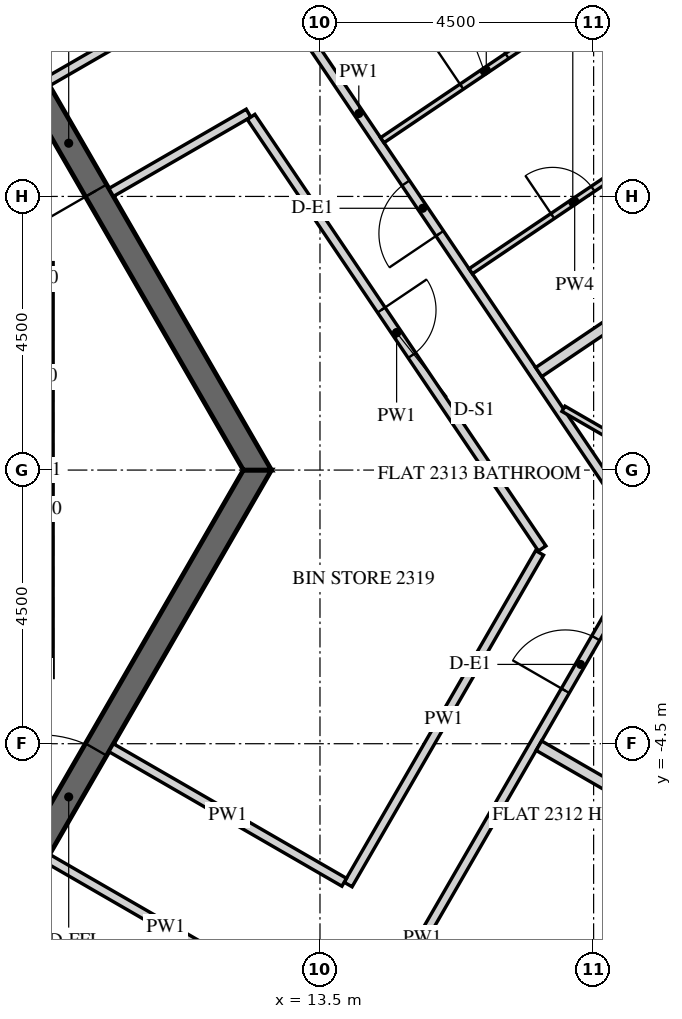
"""IFC4 building model, lengths in metres.
Left out: names, types, materials, properties, quantities, classifications, styles, units other than length and angle.
Written with IfcOpenShell. Run it as: python <this file> out.ifc"""

import sys

from ifc_helpers import new_model, si_unit, direction, frame, frame_2d, origin, place, context, subcontext, project, spatial, polyline, rectangle, outline, extrude, element, fill, save


model = new_model("IFC4")
c1 = context("Model", 3, precision=1e-05, world=origin(), true_north=direction((0.0, 1.0)))
c2 = subcontext(c1, "Body", "Model", "MODEL_VIEW")
j1 = project(units=[si_unit("LENGTHUNIT", "METRE"), si_unit("PLANEANGLEUNIT", "RADIAN")], contexts=[c1])
p1 = place(None, origin())
s1 = spatial("IfcSite", under=j1, at=p1, CompositionType="ELEMENT")
p2 = place(p1, origin())
s2 = spatial("IfcBuilding", under=s1, at=p2, CompositionType="ELEMENT")
p3 = place(p2, frame((0.0, 0.0, 291.3)))
s3 = spatial("IfcBuildingStorey", under=s2, at=p3, CompositionType="ELEMENT", Elevation=291.3)
p4 = place(p3, frame((16.451, -23.005, -0.15), z_axis=(0.0, 0.0, 1.0), x_axis=(0.500003737743, 0.866023245787, 0.0)))
e1 = element("IfcWall", 1, at=p4, inside=s3, PredefinedType="SOLIDWALL", context=c2, shape_type="SweptSolid", body=[
    extrude(outline(polyline([(-0.021, -0.25), (25.468, -0.25), (25.421, 0.25), (0.021, 0.25), (-0.021, -0.25)])), origin(), (0.0, 0.0, 1.0), 3.9),
])
p5 = place(p4, frame((2.522, 0.0, 0.75)))
e2 = element("IfcOpeningElement", 2, at=p5, cuts=e1, PredefinedType="OPENING", context=c2, shape_type="SweptSolid", body=[
    extrude(rectangle(XDim=2.4, YDim=2.7, at=frame_2d((1.2, 1.35))), frame((0.0, 0.26, 0.0), z_axis=(0.0, -1.0, 0.0), x_axis=(1.0, 0.0, 0.0)), (0.0, 0.0, 1.0), 0.52),
])
p6 = place(p4, frame((6.122, 0.0, 0.75)))
e3 = element("IfcOpeningElement", 3, at=p6, cuts=e1, PredefinedType="OPENING", context=c2, shape_type="SweptSolid", body=[
    extrude(rectangle(XDim=2.4, YDim=2.7, at=frame_2d((1.2, 1.35))), frame((0.0, 0.26, 0.0), z_axis=(0.0, -1.0, 0.0), x_axis=(1.0, 0.0, 0.0)), (0.0, 0.0, 1.0), 0.52),
])
p7 = place(p4, frame((9.722, 0.0, 0.75)))
e4 = element("IfcOpeningElement", 4, at=p7, cuts=e1, PredefinedType="OPENING", context=c2, shape_type="SweptSolid", body=[
    extrude(rectangle(XDim=2.4, YDim=2.7, at=frame_2d((1.2, 1.35))), frame((0.0, 0.26, 0.0), z_axis=(0.0, -1.0, 0.0), x_axis=(1.0, 0.0, 0.0)), (0.0, 0.0, 1.0), 0.52),
])
p8 = place(p4, frame((13.323, 0.0, 0.75)))
e5 = element("IfcOpeningElement", 5, at=p8, cuts=e1, PredefinedType="OPENING", context=c2, shape_type="SweptSolid", body=[
    extrude(rectangle(XDim=2.4, YDim=2.7, at=frame_2d((1.2, 1.35))), frame((0.0, 0.26, 0.0), z_axis=(0.0, -1.0, 0.0), x_axis=(1.0, 0.0, 0.0)), (0.0, 0.0, 1.0), 0.52),
])
p9 = place(p4, frame((16.922, 0.0, 0.75)))
e6 = element("IfcOpeningElement", 6, at=p9, cuts=e1, PredefinedType="OPENING", context=c2, shape_type="SweptSolid", body=[
    extrude(rectangle(XDim=2.4, YDim=2.7, at=frame_2d((1.2, 1.35))), frame((0.0, 0.26, 0.0), z_axis=(0.0, -1.0, 0.0), x_axis=(1.0, 0.0, 0.0)), (0.0, 0.0, 1.0), 0.52),
])
p10 = place(p4, frame((20.522, 0.0, 0.75)))
e7 = element("IfcOpeningElement", 7, at=p10, cuts=e1, PredefinedType="OPENING", context=c2, shape_type="SweptSolid", body=[
    extrude(rectangle(XDim=2.4, YDim=2.7, at=frame_2d((1.2, 1.35))), frame((0.0, 0.26, 0.0), z_axis=(0.0, -1.0, 0.0), x_axis=(1.0, 0.0, 0.0)), (0.0, 0.0, 1.0), 0.52),
])
p11 = place(p3, frame((26.706, 2.879, -0.15), z_axis=(0.0, 0.0, 1.0), x_axis=(-0.559197891507, 0.829034208061, 0.0)))
e8 = element("IfcWall", 8, at=p11, inside=s3, PredefinedType="SOLIDWALL", context=c2, shape_type="SweptSolid", body=[
    extrude(outline(polyline([(0.25, -0.25), (22.795, -0.25), (23.295, 0.25), (-0.25, 0.25), (0.25, -0.25)])), origin(), (0.0, 0.0, 1.0), 3.9),
])
p12 = place(p11, frame((1.323, 0.0, 1.05)))
e9 = element("IfcOpeningElement", 9, at=p12, cuts=e8, PredefinedType="OPENING", context=c2, shape_type="SweptSolid", body=[
    extrude(rectangle(XDim=0.9, YDim=1.5, at=frame_2d((0.45, 0.75))), frame((0.0, 0.26, 0.0), z_axis=(0.0, -1.0, 0.0), x_axis=(1.0, 0.0, 0.0)), (0.0, 0.0, 1.0), 0.52),
])
p13 = place(p11, frame((2.522, 0.0, 0.15)))
e10 = element("IfcOpeningElement", 10, at=p13, cuts=e8, PredefinedType="OPENING", context=c2, shape_type="SweptSolid", body=[
    extrude(rectangle(XDim=1.2, YDim=2.4, at=frame_2d((0.6, 1.2))), frame((0.0, 0.26, 0.0), z_axis=(0.0, -1.0, 0.0), x_axis=(1.0, 0.0, 0.0)), (0.0, 0.0, 1.0), 0.52),
])
p14 = place(p11, frame((4.922, 0.0, 1.05)))
e11 = element("IfcOpeningElement", 11, at=p14, cuts=e8, PredefinedType="OPENING", context=c2, shape_type="SweptSolid", body=[
    extrude(rectangle(XDim=0.9, YDim=1.5, at=frame_2d((0.45, 0.75))), frame((0.0, 0.26, 0.0), z_axis=(0.0, -1.0, 0.0), x_axis=(1.0, 0.0, 0.0)), (0.0, 0.0, 1.0), 0.52),
])
p15 = place(p11, frame((6.122, 0.0, 0.15)))
e12 = element("IfcOpeningElement", 12, at=p15, cuts=e8, PredefinedType="OPENING", context=c2, shape_type="SweptSolid", body=[
    extrude(rectangle(XDim=1.2, YDim=2.4, at=frame_2d((0.6, 1.2))), frame((0.0, 0.26, 0.0), z_axis=(0.0, -1.0, 0.0), x_axis=(1.0, 0.0, 0.0)), (0.0, 0.0, 1.0), 0.52),
])
p16 = place(p11, frame((8.522, 0.0, 1.05)))
e13 = element("IfcOpeningElement", 13, at=p16, cuts=e8, PredefinedType="OPENING", context=c2, shape_type="SweptSolid", body=[
    extrude(rectangle(XDim=0.9, YDim=1.5, at=frame_2d((0.45, 0.75))), frame((0.0, 0.26, 0.0), z_axis=(0.0, -1.0, 0.0), x_axis=(1.0, 0.0, 0.0)), (0.0, 0.0, 1.0), 0.52),
])
p17 = place(p11, frame((9.722, 0.0, 0.15)))
e14 = element("IfcOpeningElement", 14, at=p17, cuts=e8, PredefinedType="OPENING", context=c2, shape_type="SweptSolid", body=[
    extrude(rectangle(XDim=1.2, YDim=2.4, at=frame_2d((0.6, 1.2))), frame((0.0, 0.26, 0.0), z_axis=(0.0, -1.0, 0.0), x_axis=(1.0, 0.0, 0.0)), (0.0, 0.0, 1.0), 0.52),
])
p18 = place(p11, frame((12.122, 0.0, 1.05)))
e15 = element("IfcOpeningElement", 15, at=p18, cuts=e8, PredefinedType="OPENING", context=c2, shape_type="SweptSolid", body=[
    extrude(rectangle(XDim=0.9, YDim=1.5, at=frame_2d((0.45, 0.75))), frame((0.0, 0.26, 0.0), z_axis=(0.0, -1.0, 0.0), x_axis=(1.0, 0.0, 0.0)), (0.0, 0.0, 1.0), 0.52),
])
p19 = place(p11, frame((13.323, 0.0, 0.15)))
e16 = element("IfcOpeningElement", 16, at=p19, cuts=e8, PredefinedType="OPENING", context=c2, shape_type="SweptSolid", body=[
    extrude(rectangle(XDim=1.2, YDim=2.4, at=frame_2d((0.6, 1.2))), frame((0.0, 0.26, 0.0), z_axis=(0.0, -1.0, 0.0), x_axis=(1.0, 0.0, 0.0)), (0.0, 0.0, 1.0), 0.52),
])
p20 = place(p11, frame((15.722, 0.0, 1.05)))
e17 = element("IfcOpeningElement", 17, at=p20, cuts=e8, PredefinedType="OPENING", context=c2, shape_type="SweptSolid", body=[
    extrude(rectangle(XDim=0.9, YDim=1.5, at=frame_2d((0.45, 0.75))), frame((0.0, 0.26, 0.0), z_axis=(0.0, -1.0, 0.0), x_axis=(1.0, 0.0, 0.0)), (0.0, 0.0, 1.0), 0.52),
])
p21 = place(p11, frame((16.922, 0.0, 0.15)))
e18 = element("IfcOpeningElement", 18, at=p21, cuts=e8, PredefinedType="OPENING", context=c2, shape_type="SweptSolid", body=[
    extrude(rectangle(XDim=1.2, YDim=2.4, at=frame_2d((0.6, 1.2))), frame((0.0, 0.26, 0.0), z_axis=(0.0, -1.0, 0.0), x_axis=(1.0, 0.0, 0.0)), (0.0, 0.0, 1.0), 0.52),
])
p22 = place(p11, frame((19.323, 0.0, 1.05)))
e19 = element("IfcOpeningElement", 19, at=p22, cuts=e8, PredefinedType="OPENING", context=c2, shape_type="SweptSolid", body=[
    extrude(rectangle(XDim=0.9, YDim=1.5, at=frame_2d((0.45, 0.75))), frame((0.0, 0.26, 0.0), z_axis=(0.0, -1.0, 0.0), x_axis=(1.0, 0.0, 0.0)), (0.0, 0.0, 1.0), 0.52),
])
p23 = place(p11, frame((20.522, 0.0, 0.15)))
e20 = element("IfcOpeningElement", 20, at=p23, cuts=e8, PredefinedType="OPENING", context=c2, shape_type="SweptSolid", body=[
    extrude(rectangle(XDim=1.2, YDim=2.4, at=frame_2d((0.6, 1.2))), frame((0.0, 0.26, 0.0), z_axis=(0.0, -1.0, 0.0), x_axis=(1.0, 0.0, 0.0)), (0.0, 0.0, 1.0), 0.52),
])
p24 = place(p3, frame((6.235, -10.8, -0.15), z_axis=(0.0, 0.0, 1.0), x_axis=(0.499996419489, 0.866027470984, 0.0)))
e21 = element("IfcWall", 21, at=p24, inside=s3, PredefinedType="SHEAR", context=c2, shape_type="SweptSolid", body=[
    extrude(outline(polyline([(-0.115, -0.2), (12.586, -0.2), (12.355, 0.2), (0.115, 0.2), (-0.115, -0.2)])), origin(), (0.0, 0.0, 1.0), 3.9),
])
p25 = place(p24, frame((5.364, 0.0, 0.15)))
e22 = element("IfcOpeningElement", 22, at=p25, cuts=e21, PredefinedType="OPENING", context=c2, shape_type="SweptSolid", body=[
    extrude(rectangle(XDim=1.8, YDim=2.4, at=frame_2d((0.9, 1.2))), frame((0.0, 0.21, 0.0), z_axis=(0.0, -1.0, 0.0), x_axis=(1.0, 0.0, 0.0)), (0.0, 0.0, 1.0), 0.42),
])
p26 = place(p3, frame((12.471, 0.0, -0.15), z_axis=(0.0, 0.0, 1.0), x_axis=(-0.499996419489, 0.866027470984, 0.0)))
e23 = element("IfcWall", 23, at=p26, inside=s3, PredefinedType="SHEAR", context=c2, shape_type="SweptSolid", body=[
    extrude(outline(polyline([(-0.115, -0.2), (12.586, -0.2), (12.355, 0.2), (0.115, 0.2), (-0.115, -0.2)])), origin(), (0.0, 0.0, 1.0), 3.9),
])
p27 = place(p26, frame((5.306, 0.0, 0.15)))
e24 = element("IfcOpeningElement", 24, at=p27, cuts=e23, PredefinedType="OPENING", context=c2, shape_type="SweptSolid", body=[
    extrude(rectangle(XDim=1.8, YDim=2.4, at=frame_2d((0.9, 1.2))), frame((0.0, 0.21, 0.0), z_axis=(0.0, -1.0, 0.0), x_axis=(1.0, 0.0, 0.0)), (0.0, 0.0, 1.0), 0.42),
])
p28 = place(p3, frame((11.447, -14.174, 0.0), z_axis=(0.0, 0.0, 1.0), x_axis=(0.500003306199, 0.866023494941, 0.0)))
e25 = element("IfcWall", 25, at=p28, inside=s3, PredefinedType="PARTITIONING", context=c2, shape_type="SweptSolid", body=[
    extrude(rectangle(XDim=14.949, YDim=0.15, at=frame_2d((7.475, 0.0))), origin(), (0.0, 0.0, 1.0), 2.988),
])
p29 = place(p28, frame((2.325, 0.0, 0.0)))
e26 = element("IfcOpeningElement", 26, at=p29, cuts=e25, PredefinedType="OPENING", context=c2, shape_type="SweptSolid", body=[
    extrude(rectangle(XDim=1.0, YDim=2.1, at=frame_2d((0.5, 1.05))), frame((0.0, 0.085, 0.0), z_axis=(0.0, -1.0, 0.0), x_axis=(1.0, 0.0, 0.0)), (0.0, 0.0, 1.0), 0.17),
])
p30 = place(p28, frame((12.177, 0.0, 0.0)))
e27 = element("IfcOpeningElement", 27, at=p30, cuts=e25, PredefinedType="OPENING", context=c2, shape_type="SweptSolid", body=[
    extrude(rectangle(XDim=1.0, YDim=2.1, at=frame_2d((0.5, 1.05))), frame((0.0, 0.085, 0.0), z_axis=(0.0, -1.0, 0.0), x_axis=(1.0, 0.0, 0.0)), (0.0, 0.0, 1.0), 0.17),
])
p31 = place(p3, frame((18.875, -1.158, 0.0), z_axis=(0.0, 0.0, 1.0), x_axis=(-0.55919880344, 0.829033592945, 0.0)))
e28 = element("IfcWall", 28, at=p31, inside=s3, PredefinedType="PARTITIONING", context=c2, shape_type="SweptSolid", body=[
    extrude(rectangle(XDim=16.939, YDim=0.15, at=frame_2d((8.47, 0.0))), origin(), (0.0, 0.0, 1.0), 2.988),
])
p32 = place(p31, frame((6.09, 0.0, 0.0)))
e29 = element("IfcOpeningElement", 29, at=p32, cuts=e28, PredefinedType="OPENING", context=c2, shape_type="SweptSolid", body=[
    extrude(rectangle(XDim=1.0, YDim=2.1, at=frame_2d((0.5, 1.05))), frame((0.0, 0.085, 0.0), z_axis=(0.0, -1.0, 0.0), x_axis=(1.0, 0.0, 0.0)), (0.0, 0.0, 1.0), 0.17),
])
p33 = place(p3, frame((10.066, 4.566, 0.0), z_axis=(0.0, 0.0, 1.0), x_axis=(0.866034402474, 0.499984413489, 0.0)))
e30 = element("IfcWall", 30, at=p33, inside=s3, PredefinedType="PARTITIONING", context=c2, shape_type="SweptSolid", body=[
    extrude(rectangle(XDim=2.608, YDim=0.15, at=frame_2d((1.304, 0.0))), origin(), (0.0, 0.0, 1.0), 2.988),
])
p34 = place(p3, frame((12.367, 5.808, 0.0), z_axis=(0.0, 0.0, 1.0), x_axis=(0.559187256666, -0.829041381345, 0.0)))
e31 = element("IfcWall", 31, at=p34, inside=s3, PredefinedType="PARTITIONING", context=c2, shape_type="SweptSolid", body=[
    extrude(rectangle(XDim=8.56, YDim=0.15, at=frame_2d((4.28, 0.0))), origin(), (0.0, 0.0, 1.0), 2.988),
])
p35 = place(p34, frame((3.83, 0.0, 0.0)))
e32 = element("IfcOpeningElement", 32, at=p35, cuts=e31, PredefinedType="OPENING", context=c2, shape_type="SweptSolid", body=[
    extrude(rectangle(XDim=0.9, YDim=2.1, at=frame_2d((0.45, 1.05))), frame((0.0, 0.085, 0.0), z_axis=(0.0, -1.0, 0.0), x_axis=(1.0, 0.0, 0.0)), (0.0, 0.0, 1.0), 0.17),
])
p36 = place(p3, frame((17.112, -1.362, 0.0), z_axis=(0.0, 0.0, 1.0), x_axis=(-0.49999985423, -0.866025487945, 0.0)))
e33 = element("IfcWall", 33, at=p36, inside=s3, PredefinedType="PARTITIONING", context=c2, shape_type="SweptSolid", body=[
    extrude(rectangle(XDim=6.298, YDim=0.15, at=frame_2d((3.149, 0.0))), origin(), (0.0, 0.0, 1.0), 2.988),
])
p37 = place(p3, frame((13.898, -6.778, 0.0), z_axis=(0.0, 0.0, 1.0), x_axis=(-0.866041342403, 0.499972392486, 0.0)))
e34 = element("IfcWall", 34, at=p37, inside=s3, PredefinedType="PARTITIONING", context=c2, shape_type="SweptSolid", body=[
    extrude(rectangle(XDim=4.425, YDim=0.15, at=frame_2d((2.212, 0.0))), origin(), (0.0, 0.0, 1.0), 2.988),
])
p38 = place(p3, frame((9.016, -6.384, 0.0), z_axis=(0.0, 0.0, 1.0), x_axis=(0.866031096941, -0.499990139034, 0.0)))
e35 = element("IfcWall", 35, at=p38, inside=s3, PredefinedType="PARTITIONING", context=c2, shape_type="SweptSolid", body=[
    extrude(rectangle(XDim=4.5, YDim=0.15, at=frame_2d((2.25, 0.0))), origin(), (0.0, 0.0, 1.0), 2.988),
])
p39 = place(p3, frame((11.082, 7.578, 0.0), z_axis=(0.0, 0.0, 1.0), x_axis=(-0.865993065409, -0.500056007527, 0.0)))
e36 = element("IfcWall", 36, at=p39, inside=s3, PredefinedType="PARTITIONING", context=c2, shape_type="SweptSolid", body=[
    extrude(rectangle(XDim=2.386, YDim=0.15, at=frame_2d((1.193, 0.0))), origin(), (0.0, 0.0, 1.0), 2.988),
])
p40 = place(p3, frame((24.396, -8.745, 0.0), z_axis=(0.0, 0.0, 1.0), x_axis=(-0.866014270972, 0.500019282102, 0.0)))
e37 = element("IfcWall", 37, at=p40, inside=s3, PredefinedType="PARTITIONING", context=c2, shape_type="SweptSolid", body=[
    extrude(rectangle(XDim=8.425, YDim=0.18, at=frame_2d((4.212, 0.0))), origin(), (0.0, 0.0, 1.0), 2.988),
])
p41 = place(p3, frame((17.504, 1.008, 0.0), z_axis=(0.0, 0.0, 1.0), x_axis=(0.866022112445, -0.500005700723, 0.0)))
e38 = element("IfcWall", 38, at=p41, inside=s3, PredefinedType="PARTITIONING", context=c2, shape_type="SweptSolid", body=[
    extrude(rectangle(XDim=5.745, YDim=0.1, at=frame_2d((2.873, 0.0))), origin(), (0.0, 0.0, 1.0), 2.988),
])
p42 = place(p3, frame((24.082, 6.323, 0.0), z_axis=(0.0, 0.0, 1.0), x_axis=(-0.829037762759, -0.559192621481, 0.0)))
e39 = element("IfcWall", 39, at=p42, inside=s3, PredefinedType="PARTITIONING", context=c2, shape_type="SweptSolid", body=[
    extrude(rectangle(XDim=8.425, YDim=0.18, at=frame_2d((4.212, 0.0))), origin(), (0.0, 0.0, 1.0), 2.988),
])
p43 = place(p3, frame((14.525, 5.425, 0.0), z_axis=(0.0, 0.0, 1.0), x_axis=(0.829033204172, 0.559199379811, 0.0)))
e40 = element("IfcWall", 40, at=p43, inside=s3, PredefinedType="PARTITIONING", context=c2, shape_type="SweptSolid", body=[
    extrude(rectangle(XDim=4.125, YDim=0.1, at=frame_2d((2.062, 0.0))), origin(), (0.0, 0.0, 1.0), 2.988),
])
p44 = place(p43, frame((1.575, 0.0, 0.0)))
e41 = element("IfcOpeningElement", 41, at=p44, cuts=e40, PredefinedType="OPENING", context=c2, shape_type="SweptSolid", body=[
    extrude(rectangle(XDim=0.9, YDim=2.1, at=frame_2d((0.45, 1.05))), frame((0.0, 0.06, 0.0), z_axis=(0.0, -1.0, 0.0), x_axis=(1.0, 0.0, 0.0)), (0.0, 0.0, 1.0), 0.12),
])
p45 = place(p3, frame((15.979, 3.269, 0.0), z_axis=(0.0, 0.0, 1.0), x_axis=(0.829051710838, 0.559171942033, 0.0)))
e42 = element("IfcWall", 42, at=p45, inside=s3, PredefinedType="PARTITIONING", context=c2, shape_type="SweptSolid", body=[
    extrude(rectangle(XDim=4.125, YDim=0.1, at=frame_2d((2.062, 0.0))), origin(), (0.0, 0.0, 1.0), 2.988),
])
p46 = place(p45, frame((1.625, 0.0, 0.0)))
e43 = element("IfcOpeningElement", 43, at=p46, cuts=e42, PredefinedType="OPENING", context=c2, shape_type="SweptSolid", body=[
    extrude(rectangle(XDim=0.8, YDim=2.1, at=frame_2d((0.4, 1.05))), frame((0.0, 0.06, 0.0), z_axis=(0.0, -1.0, 0.0), x_axis=(1.0, 0.0, 0.0)), (0.0, 0.0, 1.0), 0.12),
])
p47 = place(p27, origin())
e44 = element("IfcDoor", 44, at=p47, inside=s3, OperationType="DOUBLE_DOOR_SINGLE_SWING", PredefinedType="DOOR", context=c2, shape_type="SweptSolid", body=[
    extrude(rectangle(XDim=1.8, YDim=2.4, at=frame_2d((0.9, 1.2))), frame((0.0, 0.025, 0.0), z_axis=(0.0, -1.0, 0.0), x_axis=(1.0, 0.0, 0.0)), (0.0, 0.0, 1.0), 0.05),
])
fill(e24, e44)
p48 = place(p25, origin())
e45 = element("IfcDoor", 45, at=p48, inside=s3, OperationType="DOUBLE_DOOR_SINGLE_SWING", PredefinedType="DOOR", context=c2, shape_type="SweptSolid", body=[
    extrude(rectangle(XDim=1.8, YDim=2.4, at=frame_2d((0.9, 1.2))), frame((0.0, 0.025, 0.0), z_axis=(0.0, -1.0, 0.0), x_axis=(1.0, 0.0, 0.0)), (0.0, 0.0, 1.0), 0.05),
])
fill(e22, e45)
p49 = place(p30, origin())
e46 = element("IfcDoor", 46, at=p49, inside=s3, OperationType="SINGLE_SWING_LEFT", PredefinedType="DOOR", context=c2, shape_type="SweptSolid", body=[
    extrude(rectangle(XDim=1.0, YDim=2.1, at=frame_2d((0.5, 1.05))), frame((0.0, 0.025, 0.0), z_axis=(0.0, -1.0, 0.0), x_axis=(1.0, 0.0, 0.0)), (0.0, 0.0, 1.0), 0.05),
])
fill(e27, e46)
p50 = place(p32, origin())
e47 = element("IfcDoor", 47, at=p50, inside=s3, OperationType="SINGLE_SWING_LEFT", PredefinedType="DOOR", context=c2, shape_type="SweptSolid", body=[
    extrude(rectangle(XDim=1.0, YDim=2.1, at=frame_2d((0.5, 1.05))), frame((0.0, 0.025, 0.0), z_axis=(0.0, -1.0, 0.0), x_axis=(1.0, 0.0, 0.0)), (0.0, 0.0, 1.0), 0.05),
])
fill(e29, e47)
p51 = place(p46, origin())
e48 = element("IfcDoor", 48, at=p51, inside=s3, OperationType="SINGLE_SWING_RIGHT", PredefinedType="DOOR", context=c2, shape_type="SweptSolid", body=[
    extrude(rectangle(XDim=0.8, YDim=2.1, at=frame_2d((0.4, 1.05))), frame((0.0, 0.025, 0.0), z_axis=(0.0, -1.0, 0.0), x_axis=(1.0, 0.0, 0.0)), (0.0, 0.0, 1.0), 0.05),
])
fill(e43, e48)
p52 = place(p44, origin())
e49 = element("IfcDoor", 49, at=p52, inside=s3, OperationType="SINGLE_SWING_RIGHT", PredefinedType="DOOR", context=c2, shape_type="SweptSolid", body=[
    extrude(rectangle(XDim=0.9, YDim=2.1, at=frame_2d((0.45, 1.05))), frame((0.0, 0.025, 0.0), z_axis=(0.0, -1.0, 0.0), x_axis=(1.0, 0.0, 0.0)), (0.0, 0.0, 1.0), 0.05),
])
fill(e41, e49)
p53 = place(p35, origin())
e50 = element("IfcDoor", 50, at=p53, inside=s3, OperationType="SINGLE_SWING_RIGHT", PredefinedType="DOOR", context=c2, shape_type="SweptSolid", body=[
    extrude(rectangle(XDim=0.9, YDim=2.1, at=frame_2d((0.45, 1.05))), frame((0.0, 0.025, 0.0), z_axis=(0.0, -1.0, 0.0), x_axis=(1.0, 0.0, 0.0)), (0.0, 0.0, 1.0), 0.05),
])
fill(e32, e50)
save(model, sys.argv[1])
